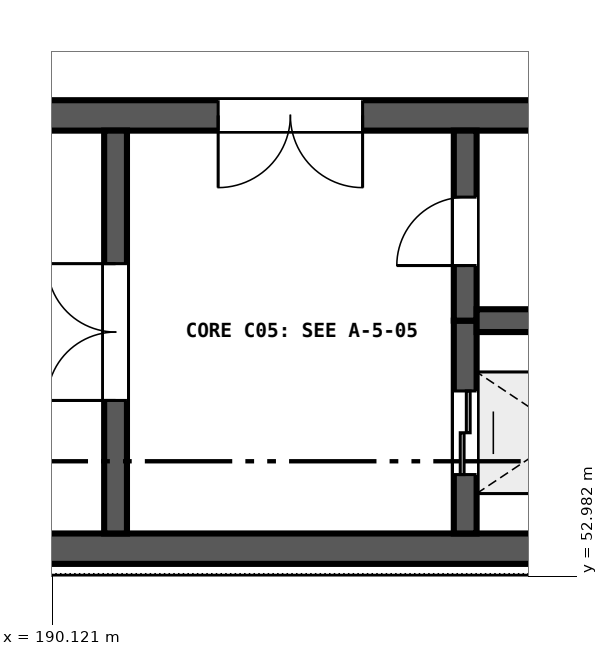
"""IFC4 building model, lengths in metres.
Left out: names, types, materials, properties, quantities, classifications, styles, units other than length and angle.
Written with IfcOpenShell. Run it as: python <this file> out.ifc"""

import sys

from ifc_helpers import new_model, si_unit, direction, frame, frame_2d, origin, place, context, subcontext, project, spatial, rectangle, extrude, element, fill, save


model = new_model("IFC4")
c1 = context("Model", 3, precision=1e-05, world=origin(), true_north=direction((0.0, 1.0)))
c2 = subcontext(c1, "Body", "Model", "MODEL_VIEW")
j1 = project(units=[si_unit("LENGTHUNIT", "METRE"), si_unit("PLANEANGLEUNIT", "RADIAN")], contexts=[c1])
p1 = place(None, origin())
s1 = spatial("IfcSite", under=j1, at=p1, CompositionType="ELEMENT")
p2 = place(p1, origin())
s2 = spatial("IfcBuilding", under=s1, at=p2, CompositionType="ELEMENT")
p3 = place(p2, origin())
s3 = spatial("IfcBuildingStorey", under=s2, at=p3, CompositionType="ELEMENT", Elevation=0.0)
p4 = place(p3, frame((180.9, 53.35, 0.0), z_axis=(0.0, 0.0, 1.0), x_axis=(1.0, 0.0, 0.0)))
e1 = element("IfcWall", 1, at=p4, inside=s3, PredefinedType="SHEAR", context=c2, shape_type="SweptSolid", body=[
    extrude(rectangle(XDim=18.0, YDim=0.4, at=frame_2d((9.0, 0.0))), origin(), (0.0, 0.0, 1.0), 4.5),
])
p5 = place(p3, frame((198.9, 59.05, 0.0), z_axis=(0.0, 0.0, 1.0), x_axis=(-1.0, 0.0, 0.0)))
e2 = element("IfcWall", 2, at=p5, inside=s3, PredefinedType="SHEAR", context=c2, shape_type="SweptSolid", body=[
    extrude(rectangle(XDim=18.0, YDim=0.4, at=frame_2d((9.0, 0.0))), origin(), (0.0, 0.0, 1.0), 4.5),
])
p6 = place(p5, frame((4.7, 0.0, 0.0)))
e3 = element("IfcOpeningElement", 3, at=p6, cuts=e2, PredefinedType="OPENING", context=c2, shape_type="SweptSolid", body=[
    extrude(rectangle(XDim=1.9, YDim=2.25, at=frame_2d((0.95, 1.125))), frame((0.0, 0.21, 0.0), z_axis=(0.0, -1.0, 0.0), x_axis=(1.0, 0.0, 0.0)), (0.0, 0.0, 1.0), 0.42),
])
p7 = place(p3, frame((190.95, 53.55, 0.0), z_axis=(0.0, 0.0, 1.0), x_axis=(0.0, 1.0, 0.0)))
e4 = element("IfcWall", 4, at=p7, inside=s3, PredefinedType="SHEAR", context=c2, shape_type="SweptSolid", body=[
    extrude(rectangle(XDim=5.3, YDim=0.3, at=frame_2d((2.65, 0.0))), origin(), (0.0, 0.0, 1.0), 4.5),
])
p8 = place(p7, frame((1.75, 0.0, 0.0)))
e5 = element("IfcOpeningElement", 5, at=p8, cuts=e4, PredefinedType="OPENING", context=c2, shape_type="SweptSolid", body=[
    extrude(rectangle(XDim=1.8, YDim=2.25, at=frame_2d((0.9, 1.125))), frame((0.0, 0.16, 0.0), z_axis=(0.0, -1.0, 0.0), x_axis=(1.0, 0.0, 0.0)), (0.0, 0.0, 1.0), 0.32),
])
p9 = place(p3, frame((195.55, 53.55, 0.0), z_axis=(0.0, 0.0, 1.0), x_axis=(0.0, 1.0, 0.0)))
e6 = element("IfcWall", 6, at=p9, inside=s3, PredefinedType="SHEAR", context=c2, shape_type="SweptSolid", body=[
    extrude(rectangle(XDim=2.8, YDim=0.3, at=frame_2d((1.4, 0.0))), origin(), (0.0, 0.0, 1.0), 4.5),
])
p10 = place(p9, frame((0.775, 0.0, 0.0)))
e7 = element("IfcOpeningElement", 7, at=p10, cuts=e6, PredefinedType="OPENING", context=c2, shape_type="SweptSolid", body=[
    extrude(rectangle(XDim=1.1, YDim=2.1, at=frame_2d((0.55, 1.05))), frame((0.0, 0.16, 0.0), z_axis=(0.0, -1.0, 0.0), x_axis=(1.0, 0.0, 0.0)), (0.0, 0.0, 1.0), 0.32),
])
p11 = place(p3, frame((195.55, 56.35, 0.0), z_axis=(0.0, 0.0, 1.0), x_axis=(0.0, 1.0, 0.0)))
e8 = element("IfcWall", 8, at=p11, inside=s3, PredefinedType="SHEAR", context=c2, shape_type="SweptSolid", body=[
    extrude(rectangle(XDim=2.5, YDim=0.3, at=frame_2d((1.25, 0.0))), origin(), (0.0, 0.0, 1.0), 4.5),
])
p12 = place(p11, frame((0.725, 0.0, 0.0)))
e9 = element("IfcOpeningElement", 9, at=p12, cuts=e8, PredefinedType="OPENING", context=c2, shape_type="SweptSolid", body=[
    extrude(rectangle(XDim=0.9, YDim=2.1, at=frame_2d((0.45, 1.05))), frame((0.0, 0.16, 0.0), z_axis=(0.0, -1.0, 0.0), x_axis=(1.0, 0.0, 0.0)), (0.0, 0.0, 1.0), 0.32),
])
p13 = place(p3, frame((195.7, 56.35, 0.0), z_axis=(0.0, 0.0, 1.0), x_axis=(1.0, 0.0, 0.0)))
e10 = element("IfcWall", 10, at=p13, inside=s3, PredefinedType="SHEAR", context=c2, shape_type="SweptSolid", body=[
    extrude(rectangle(XDim=2.85, YDim=0.3, at=frame_2d((1.425, 0.0))), origin(), (0.0, 0.0, 1.0), 4.5),
])
p14 = place(p8, origin())
e11 = element("IfcDoor", 11, at=p14, inside=s3, OperationType="DOUBLE_DOOR_SINGLE_SWING", PredefinedType="DOOR", context=c2, shape_type="SweptSolid", body=[
    extrude(rectangle(XDim=1.8, YDim=2.25, at=frame_2d((0.9, 1.125))), frame((0.0, 0.025, 0.0), z_axis=(0.0, -1.0, 0.0), x_axis=(1.0, 0.0, 0.0)), (0.0, 0.0, 1.0), 0.05),
])
fill(e5, e11)
p15 = place(p12, origin())
e12 = element("IfcDoor", 12, at=p15, inside=s3, OperationType="SINGLE_SWING_LEFT", PredefinedType="DOOR", context=c2, shape_type="SweptSolid", body=[
    extrude(rectangle(XDim=0.9, YDim=2.1, at=frame_2d((0.45, 1.05))), frame((0.0, 0.025, 0.0), z_axis=(0.0, -1.0, 0.0), x_axis=(1.0, 0.0, 0.0)), (0.0, 0.0, 1.0), 0.05),
])
fill(e9, e12)
p16 = place(p10, origin())
e13 = element("IfcDoor", 13, at=p16, inside=s3, OperationType="DOUBLE_DOOR_SLIDING", PredefinedType="DOOR", context=c2, shape_type="SweptSolid", body=[
    extrude(rectangle(XDim=1.1, YDim=2.1, at=frame_2d((0.55, 1.05))), frame((0.0, 0.025, 0.0), z_axis=(0.0, -1.0, 0.0), x_axis=(1.0, 0.0, 0.0)), (0.0, 0.0, 1.0), 0.05),
])
fill(e7, e13)
p17 = place(p6, origin())
e14 = element("IfcDoor", 14, at=p17, inside=s3, OperationType="DOUBLE_DOOR_SINGLE_SWING", PredefinedType="DOOR", context=c2, shape_type="SweptSolid", body=[
    extrude(rectangle(XDim=1.9, YDim=2.25, at=frame_2d((0.95, 1.125))), frame((0.0, 0.025, 0.0), z_axis=(0.0, -1.0, 0.0), x_axis=(1.0, 0.0, 0.0)), (0.0, 0.0, 1.0), 0.05),
])
fill(e3, e14)
save(model, sys.argv[1])
